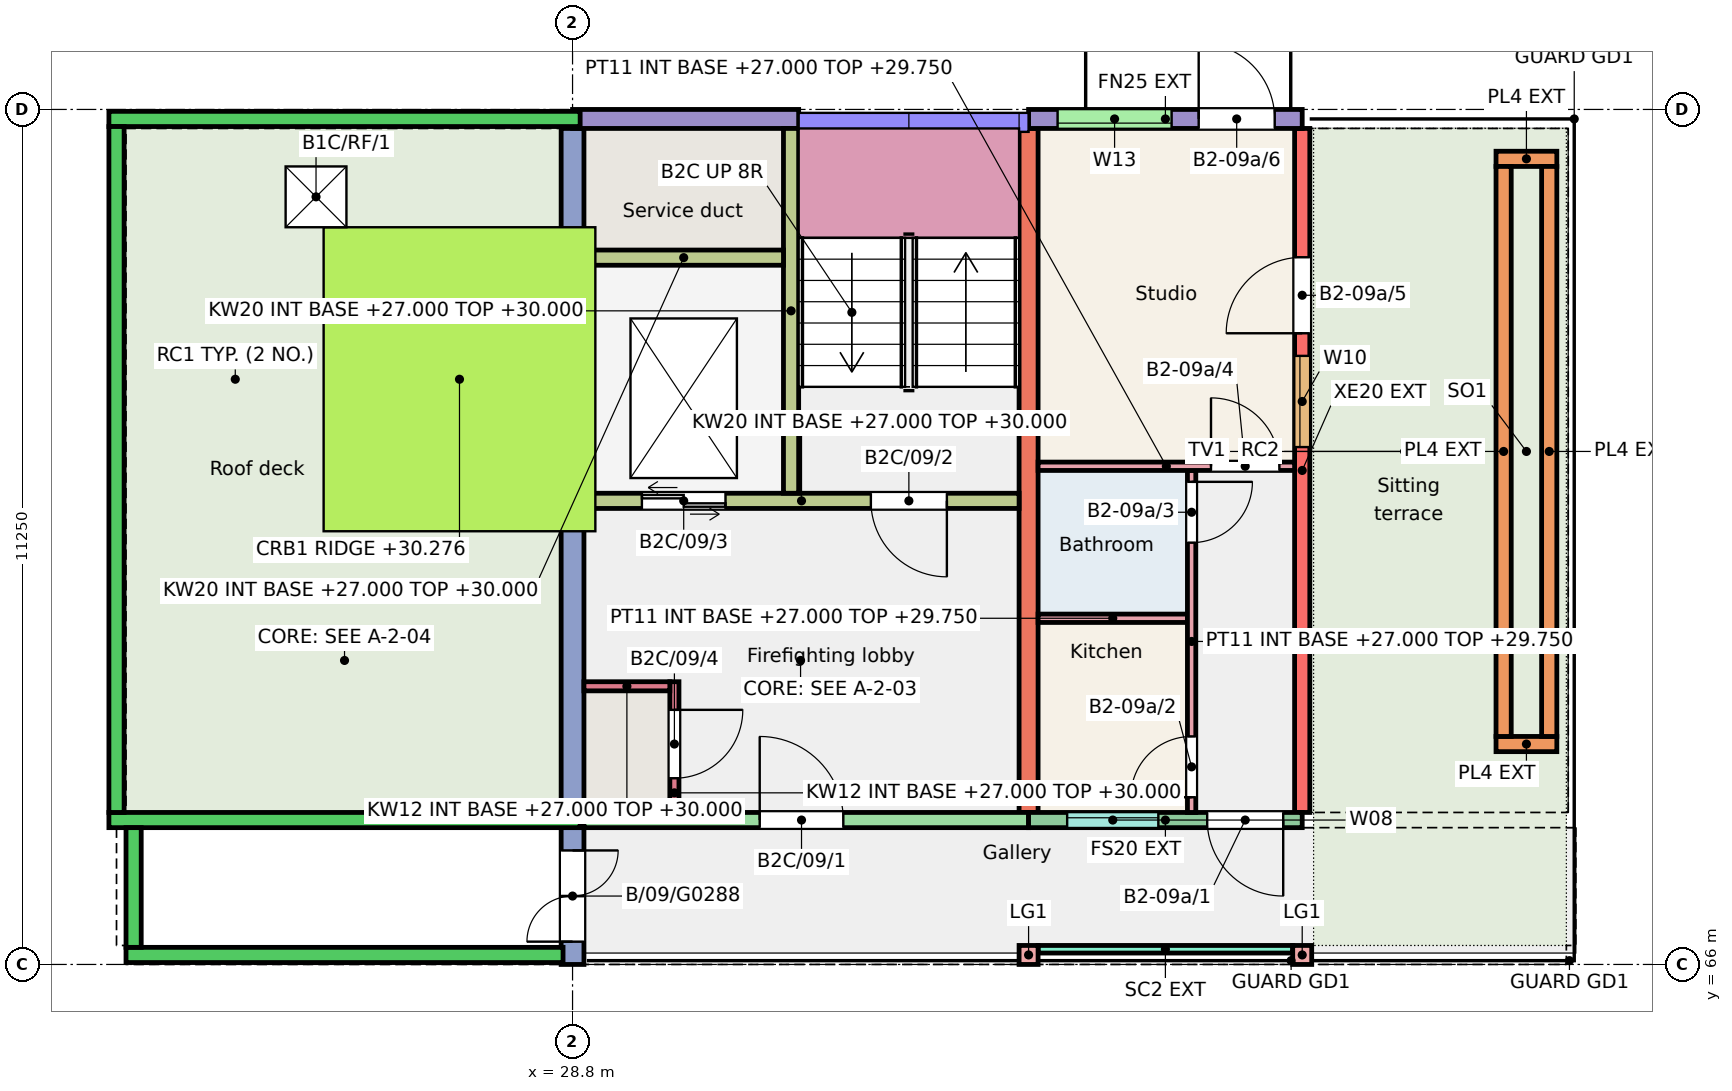
"""IFC4 building model, lengths in metres.
Left out: names, types, materials, properties, quantities, classifications, styles, units other than length and angle.
Written with IfcOpenShell. Run it as: python <this file> out.ifc"""

import sys

from ifc_helpers import new_model, si_unit, direction, frame, frame_2d, origin, origin_2d, place, context, subcontext, project, spatial, rectangle, extrude, element, fill, save


model = new_model("IFC4")
c1 = context("Model", 3, precision=1e-05, world=origin(), true_north=direction((0.0, 1.0)))
c2 = subcontext(c1, "Body", "Model", "MODEL_VIEW")
j1 = project(units=[si_unit("LENGTHUNIT", "METRE"), si_unit("PLANEANGLEUNIT", "RADIAN")], contexts=[c1])
p1 = place(None, origin())
s1 = spatial("IfcSite", under=j1, at=p1, CompositionType="ELEMENT")
p2 = place(p1, origin())
s2 = spatial("IfcBuilding", under=s1, at=p2, CompositionType="ELEMENT")
p3 = place(p2, frame((0.0, 0.0, 27.0)))
s3 = spatial("IfcBuildingStorey", under=s2, at=p3, CompositionType="ELEMENT", Elevation=27.0)
p4 = place(p3, frame((28.8, 66.0, 0.0), z_axis=(0.0, 0.0, 1.0), x_axis=(0.0, 1.0, 0.0)))
e1 = element("IfcWall", 1, at=p4, inside=s3, PredefinedType="SHEAR", context=c2, shape_type="SweptSolid", body=[
    extrude(rectangle(XDim=11.0, YDim=0.3, at=frame_2d((5.5, 0.0))), origin(), (0.0, 0.0, 1.0), 3.0),
])
p5 = place(p4, frame((0.3, 0.0, 0.0)))
e2 = element("IfcOpeningElement", 2, at=p5, cuts=e1, PredefinedType="OPENING", context=c2, shape_type="SweptSolid", body=[
    extrude(rectangle(XDim=1.2, YDim=2.1, at=frame_2d((0.6, 1.05))), frame((0.0, 0.16, 0.0), z_axis=(0.0, -1.0, 0.0), x_axis=(1.0, 0.0, 0.0)), (0.0, 0.0, 1.0), 0.32),
])
p6 = place(p3, frame((34.8, 68.0, 0.0), z_axis=(0.0, 0.0, 1.0), x_axis=(0.0, 1.0, 0.0)))
e3 = element("IfcWall", 3, at=p6, inside=s3, PredefinedType="SHEAR", context=c2, shape_type="SweptSolid", body=[
    extrude(rectangle(XDim=9.0, YDim=0.25, at=frame_2d((4.5, 0.0))), origin(), (0.0, 0.0, 1.0), 3.0),
])
p7 = place(p3, frame((38.4, 68.0, 0.0), z_axis=(0.0, 0.0, 1.0), x_axis=(0.0, 1.0, 0.0)))
e4 = element("IfcWall", 4, at=p7, inside=s3, PredefinedType="SHEAR", context=c2, shape_type="SweptSolid", body=[
    extrude(rectangle(XDim=9.0, YDim=0.2, at=frame_2d((4.5, 0.0))), origin(), (0.0, 0.0, 1.0), 3.0),
])
p8 = place(p7, frame((4.808, 0.0, 0.9)))
e5 = element("IfcOpeningElement", 5, at=p8, cuts=e4, PredefinedType="OPENING", context=c2, shape_type="SweptSolid", body=[
    extrude(rectangle(XDim=1.2, YDim=1.5, at=frame_2d((0.6, 0.75))), frame((0.0, 0.11, 0.0), z_axis=(0.0, -1.0, 0.0), x_axis=(1.0, 0.0, 0.0)), (0.0, 0.0, 1.0), 0.22),
])
p9 = place(p7, frame((6.305, 0.0, 0.0)))
e6 = element("IfcOpeningElement", 6, at=p9, cuts=e4, PredefinedType="OPENING", context=c2, shape_type="SweptSolid", body=[
    extrude(rectangle(XDim=1.0, YDim=2.1, at=frame_2d((0.5, 1.05))), frame((0.0, 0.11, 0.0), z_axis=(0.0, -1.0, 0.0), x_axis=(1.0, 0.0, 0.0)), (0.0, 0.0, 1.0), 0.22),
])
p10 = place(p3, frame((28.8, 77.125, 0.0), z_axis=(0.0, 0.0, 1.0), x_axis=(1.0, 0.0, 0.0)))
e7 = element("IfcWall", 7, at=p10, inside=s3, PredefinedType="SOLIDWALL", context=c2, shape_type="SweptSolid", body=[
    extrude(rectangle(XDim=2.975, YDim=0.25, at=frame_2d((1.487, 0.0))), origin(), (0.0, 0.0, 1.0), 3.0),
])
p11 = place(p3, frame((28.95, 67.9, 0.0), z_axis=(0.0, 0.0, 1.0), x_axis=(1.0, 0.0, 0.0)))
e8 = element("IfcWall", 8, at=p11, inside=s3, PredefinedType="SHEAR", context=c2, shape_type="SweptSolid", body=[
    extrude(rectangle(XDim=5.85, YDim=0.2, at=frame_2d((2.925, 0.0))), origin(), (0.0, 0.0, 1.0), 3.0),
])
p12 = place(p11, frame((2.312, 0.0, 0.0)))
e9 = element("IfcOpeningElement", 9, at=p12, cuts=e8, PredefinedType="OPENING", context=c2, shape_type="SweptSolid", body=[
    extrude(rectangle(XDim=1.1, YDim=2.1, at=frame_2d((0.55, 1.05))), frame((0.0, 0.11, 0.0), z_axis=(0.0, -1.0, 0.0), x_axis=(1.0, 0.0, 0.0)), (0.0, 0.0, 1.0), 0.22),
])
p13 = place(p3, frame((28.95, 72.1, 0.0), z_axis=(0.0, 0.0, 1.0), x_axis=(1.0, 0.0, 0.0)))
e10 = element("IfcWall", 10, at=p13, inside=s3, PredefinedType="SHEAR", context=c2, shape_type="SweptSolid", body=[
    extrude(rectangle(XDim=5.725, YDim=0.2, at=frame_2d((2.863, 0.0))), origin(), (0.0, 0.0, 1.0), 3.0),
])
p14 = place(p13, frame((3.775, 0.0, 0.0)))
e11 = element("IfcOpeningElement", 11, at=p14, cuts=e10, PredefinedType="OPENING", context=c2, shape_type="SweptSolid", body=[
    extrude(rectangle(XDim=1.0, YDim=2.1, at=frame_2d((0.5, 1.05))), frame((0.0, 0.11, 0.0), z_axis=(0.0, -1.0, 0.0), x_axis=(1.0, 0.0, 0.0)), (0.0, 0.0, 1.0), 0.22),
])
p15 = place(p13, frame((0.762, 0.0, 0.0)))
e12 = element("IfcOpeningElement", 12, at=p15, cuts=e10, PredefinedType="OPENING", context=c2, shape_type="SweptSolid", body=[
    extrude(rectangle(XDim=1.1, YDim=2.1, at=frame_2d((0.55, 1.05))), frame((0.0, 0.11, 0.0), z_axis=(0.0, -1.0, 0.0), x_axis=(1.0, 0.0, 0.0)), (0.0, 0.0, 1.0), 0.22),
])
p16 = place(p3, frame((31.675, 72.2, 0.0), z_axis=(0.0, 0.0, 1.0), x_axis=(0.0, 1.0, 0.0)))
e13 = element("IfcWall", 13, at=p16, inside=s3, PredefinedType="SHEAR", context=c2, shape_type="SweptSolid", body=[
    extrude(rectangle(XDim=4.8, YDim=0.2, at=frame_2d((2.4, 0.0))), origin(), (0.0, 0.0, 1.0), 3.0),
])
p17 = place(p3, frame((28.95, 75.3, 0.0), z_axis=(0.0, 0.0, 1.0), x_axis=(1.0, 0.0, 0.0)))
e14 = element("IfcWall", 14, at=p17, inside=s3, PredefinedType="SHEAR", context=c2, shape_type="SweptSolid", body=[
    extrude(rectangle(XDim=2.625, YDim=0.2, at=frame_2d((1.312, 0.0))), origin(), (0.0, 0.0, 1.0), 3.0),
])
p18 = place(p3, frame((30.14, 68.0, 0.0), z_axis=(0.0, 0.0, 1.0), x_axis=(0.0, 1.0, 0.0)))
e15 = element("IfcWall", 15, at=p18, inside=s3, PredefinedType="SHEAR", context=c2, shape_type="SweptSolid", body=[
    extrude(rectangle(XDim=1.72, YDim=0.12, at=frame_2d((0.86, 0.0))), origin(), (0.0, 0.0, 1.0), 3.0),
])
p19 = place(p18, frame((0.45, 0.0, 0.0)))
e16 = element("IfcOpeningElement", 16, at=p19, cuts=e15, PredefinedType="OPENING", context=c2, shape_type="SweptSolid", body=[
    extrude(rectangle(XDim=0.9, YDim=2.1, at=frame_2d((0.45, 1.05))), frame((0.0, 0.07, 0.0), z_axis=(0.0, -1.0, 0.0), x_axis=(1.0, 0.0, 0.0)), (0.0, 0.0, 1.0), 0.14),
])
p20 = place(p3, frame((28.95, 69.66, 0.0), z_axis=(0.0, 0.0, 1.0), x_axis=(1.0, 0.0, 0.0)))
e17 = element("IfcWall", 17, at=p20, inside=s3, PredefinedType="SHEAR", context=c2, shape_type="SweptSolid", body=[
    extrude(rectangle(XDim=1.13, YDim=0.12, at=frame_2d((0.565, 0.0))), origin(), (0.0, 0.0, 1.0), 3.0),
])
p21 = place(p3, frame((34.8, 77.125, 0.0), z_axis=(0.0, 0.0, 1.0), x_axis=(1.0, 0.0, 0.0)))
e18 = element("IfcWall", 18, at=p21, inside=s3, PredefinedType="SOLIDWALL", context=c2, shape_type="SweptSolid", body=[
    extrude(rectangle(XDim=3.6, YDim=0.25, at=frame_2d((1.8, 0.0))), origin(), (0.0, 0.0, 1.0), 3.0),
])
p22 = place(p21, frame((0.382, 0.0, 1.2)))
e19 = element("IfcOpeningElement", 19, at=p22, cuts=e18, PredefinedType="OPENING", context=c2, shape_type="SweptSolid", body=[
    extrude(rectangle(XDim=1.5, YDim=1.2, at=frame_2d((0.75, 0.6))), frame((0.0, 0.135, 0.0), z_axis=(0.0, -1.0, 0.0), x_axis=(1.0, 0.0, 0.0)), (0.0, 0.0, 1.0), 0.27),
])
p23 = place(p21, frame((2.238, 0.0, 0.0)))
e20 = element("IfcOpeningElement", 20, at=p23, cuts=e18, PredefinedType="OPENING", context=c2, shape_type="SweptSolid", body=[
    extrude(rectangle(XDim=1.0, YDim=2.1, at=frame_2d((0.5, 1.05))), frame((0.0, 0.135, 0.0), z_axis=(0.0, -1.0, 0.0), x_axis=(1.0, 0.0, 0.0)), (0.0, 0.0, 1.0), 0.27),
])
p24 = place(p3, frame((34.8, 67.9, 0.0), z_axis=(0.0, 0.0, 1.0), x_axis=(1.0, 0.0, 0.0)))
e21 = element("IfcWall", 21, at=p24, inside=s3, PredefinedType="SOLIDWALL", context=c2, shape_type="SweptSolid", body=[
    extrude(rectangle(XDim=3.6, YDim=0.2, at=frame_2d((1.8, 0.0))), origin(), (0.0, 0.0, 1.0), 3.0),
])
p25 = place(p24, frame((0.508, 0.0, 1.1)))
e22 = element("IfcOpeningElement", 22, at=p25, cuts=e21, PredefinedType="OPENING", context=c2, shape_type="SweptSolid", body=[
    extrude(rectangle(XDim=1.2, YDim=1.3, at=frame_2d((0.6, 0.65))), frame((0.0, 0.11, 0.0), z_axis=(0.0, -1.0, 0.0), x_axis=(1.0, 0.0, 0.0)), (0.0, 0.0, 1.0), 0.22),
])
p26 = place(p24, frame((2.35, 0.0, 0.0)))
e23 = element("IfcOpeningElement", 23, at=p26, cuts=e21, PredefinedType="OPENING", context=c2, shape_type="SweptSolid", body=[
    extrude(rectangle(XDim=1.0, YDim=2.1, at=frame_2d((0.5, 1.05))), frame((0.0, 0.11, 0.0), z_axis=(0.0, -1.0, 0.0), x_axis=(1.0, 0.0, 0.0)), (0.0, 0.0, 1.0), 0.22),
])
for number, where, z_axis, x_axis in (
    (24, (34.8, 66.125, 0.0), (0.0, 0.0, 1.0), (1.0, 0.0, 0.0)),
    (25, (38.4, 66.125, 0.0), (0.0, 0.0, 1.0), (1.0, 0.0, 0.0)),
):
    element("IfcColumn", number, at=place(p3, frame(where, z_axis=z_axis, x_axis=x_axis)), inside=s3, PredefinedType="COLUMN", context=c2, shape_type="SweptSolid", body=[
        extrude(rectangle(XDim=0.25, YDim=0.25, at=origin_2d()), origin(), (0.0, 0.0, 1.0), 3.0),
    ])
for number, where, z_axis, x_axis in (
    (26, (25.825, 72.1, 0.0), (0.0, 0.0, 1.0), (1.0, 0.0, 0.0)),
    (27, (25.825, 75.3, 0.0), (0.0, 0.0, 1.0), (1.0, 0.0, 0.0)),
):
    element("IfcWall", number, at=place(p3, frame(where, z_axis=z_axis, x_axis=x_axis)), inside=s3, PredefinedType="SHEAR", context=c2, shape_type="SweptSolid", body=[
        extrude(rectangle(XDim=2.825, YDim=0.2, at=frame_2d((1.413, 0.0))), origin(), (0.0, 0.0, 1.0), 1.5),
    ])
p27 = place(p3, frame((25.925, 72.2, 0.0), z_axis=(0.0, 0.0, 1.0), x_axis=(0.0, 1.0, 0.0)))
e28 = element("IfcWall", 28, at=p27, inside=s3, PredefinedType="SHEAR", context=c2, shape_type="SweptSolid", body=[
    extrude(rectangle(XDim=3.0, YDim=0.2, at=frame_2d((1.5, 0.0))), origin(), (0.0, 0.0, 1.0), 1.5),
])
for number, where, z_axis, x_axis in (
    (29, (22.7, 77.125, 0.0), (0.0, 0.0, 1.0), (1.0, 0.0, 0.0)),
    (30, (22.7, 67.9, 0.0), (0.0, 0.0, 1.0), (1.0, 0.0, 0.0)),
):
    element("IfcWall", number, at=place(p3, frame(where, z_axis=z_axis, x_axis=x_axis)), inside=s3, PredefinedType="PARAPET", context=c2, shape_type="SweptSolid", body=[
        extrude(rectangle(XDim=6.2, YDim=0.2, at=frame_2d((3.1, 0.0))), origin(), (0.0, 0.0, 1.0), 1.1),
    ])
p28 = place(p3, frame((22.8, 68.0, 0.0), z_axis=(0.0, 0.0, 1.0), x_axis=(0.0, 1.0, 0.0)))
e31 = element("IfcWall", 31, at=p28, inside=s3, PredefinedType="PARAPET", context=c2, shape_type="SweptSolid", body=[
    extrude(rectangle(XDim=9.025, YDim=0.2, at=frame_2d((4.512, 0.0))), origin(), (0.0, 0.0, 1.0), 1.1),
])
p29 = place(p3, frame((22.925, 66.125, 0.0), z_axis=(0.0, 0.0, 1.0), x_axis=(1.0, 0.0, 0.0)))
e32 = element("IfcWall", 32, at=p29, inside=s3, PredefinedType="PARAPET", context=c2, shape_type="SweptSolid", body=[
    extrude(rectangle(XDim=5.75, YDim=0.2, at=frame_2d((2.875, 0.0))), origin(), (0.0, 0.0, 1.0), 1.1),
])
p30 = place(p3, frame((23.025, 66.225, 0.0), z_axis=(0.0, 0.0, 1.0), x_axis=(0.0, 1.0, 0.0)))
e33 = element("IfcWall", 33, at=p30, inside=s3, PredefinedType="PARAPET", context=c2, shape_type="SweptSolid", body=[
    extrude(rectangle(XDim=1.575, YDim=0.2, at=frame_2d((0.788, 0.0))), origin(), (0.0, 0.0, 1.0), 1.1),
])
for number, where, z_axis, x_axis in (
    (34, (40.95, 68.9, 0.01), (0.0, 0.0, 1.0), (1.0, 0.0, 0.0)),
    (35, (40.95, 76.6, 0.01), (0.0, 0.0, 1.0), (1.0, 0.0, 0.0)),
):
    element("IfcWall", number, at=place(p3, frame(where, z_axis=z_axis, x_axis=x_axis)), inside=s3, PredefinedType="SOLIDWALL", context=c2, shape_type="SweptSolid", body=[
        extrude(rectangle(XDim=0.8, YDim=0.2, at=frame_2d((0.4, 0.0))), origin(), (0.0, 0.0, 1.0), 0.45),
    ])
for number, where, z_axis, x_axis in (
    (36, (41.05, 69.0, 0.01), (0.0, 0.0, 1.0), (0.0, 1.0, 0.0)),
    (37, (41.65, 69.0, 0.01), (0.0, 0.0, 1.0), (0.0, 1.0, 0.0)),
):
    element("IfcWall", number, at=place(p3, frame(where, z_axis=z_axis, x_axis=x_axis)), inside=s3, PredefinedType="SOLIDWALL", context=c2, shape_type="SweptSolid", body=[
        extrude(rectangle(XDim=7.5, YDim=0.2, at=frame_2d((3.75, 0.0))), origin(), (0.0, 0.0, 1.0), 0.45),
    ])
p31 = place(p3, frame((34.925, 66.2, 0.0), z_axis=(0.0, 0.0, 1.0), x_axis=(1.0, 0.0, 0.0)))
e38 = element("IfcWall", 38, at=p31, inside=s3, PredefinedType="SOLIDWALL", context=c2, shape_type="SweptSolid", body=[
    extrude(rectangle(XDim=3.35, YDim=0.1, at=frame_2d((1.675, 0.0))), origin(), (0.0, 0.0, 1.0), 2.45),
])
p32 = place(p3, frame((34.925, 70.555, 0.0), z_axis=(0.0, 0.0, 1.0), x_axis=(1.0, 0.0, 0.0)))
e39 = element("IfcWall", 39, at=p32, inside=s3, PredefinedType="PARTITIONING", context=c2, shape_type="SweptSolid", body=[
    extrude(rectangle(XDim=1.965, YDim=0.11, at=frame_2d((0.982, 0.0))), origin(), (0.0, 0.0, 1.0), 2.75),
])
p33 = place(p3, frame((36.945, 68.0, 0.0), z_axis=(0.0, 0.0, 1.0), x_axis=(0.0, 1.0, 0.0)))
e40 = element("IfcWall", 40, at=p33, inside=s3, PredefinedType="PARTITIONING", context=c2, shape_type="SweptSolid", body=[
    extrude(rectangle(XDim=4.5, YDim=0.11, at=frame_2d((2.25, 0.0))), origin(), (0.0, 0.0, 1.0), 2.75),
])
p34 = place(p33, frame((0.2, 0.0, 0.0)))
e41 = element("IfcOpeningElement", 41, at=p34, cuts=e40, PredefinedType="OPENING", context=c2, shape_type="SweptSolid", body=[
    extrude(rectangle(XDim=0.8, YDim=2.1, at=frame_2d((0.4, 1.05))), frame((0.0, 0.065, 0.0), z_axis=(0.0, -1.0, 0.0), x_axis=(1.0, 0.0, 0.0)), (0.0, 0.0, 1.0), 0.13),
])
p35 = place(p33, frame((3.55, 0.0, 0.0)))
e42 = element("IfcOpeningElement", 42, at=p35, cuts=e40, PredefinedType="OPENING", context=c2, shape_type="SweptSolid", body=[
    extrude(rectangle(XDim=0.8, YDim=2.1, at=frame_2d((0.4, 1.05))), frame((0.0, 0.065, 0.0), z_axis=(0.0, -1.0, 0.0), x_axis=(1.0, 0.0, 0.0)), (0.0, 0.0, 1.0), 0.13),
])
p36 = place(p3, frame((34.925, 72.555, 0.0), z_axis=(0.0, 0.0, 1.0), x_axis=(1.0, 0.0, 0.0)))
e43 = element("IfcWall", 43, at=p36, inside=s3, PredefinedType="PARTITIONING", context=c2, shape_type="SweptSolid", body=[
    extrude(rectangle(XDim=3.375, YDim=0.11, at=frame_2d((1.688, 0.0))), origin(), (0.0, 0.0, 1.0), 2.75),
])
p37 = place(p36, frame((2.275, 0.0, 0.0)))
e44 = element("IfcOpeningElement", 44, at=p37, cuts=e43, PredefinedType="OPENING", context=c2, shape_type="SweptSolid", body=[
    extrude(rectangle(XDim=0.9, YDim=2.1, at=frame_2d((0.45, 1.05))), frame((0.0, 0.065, 0.0), z_axis=(0.0, -1.0, 0.0), x_axis=(1.0, 0.0, 0.0)), (0.0, 0.0, 1.0), 0.13),
])
p38 = place(p3, frame((0.0, 0.0, -0.25)))
p39 = place(p38, frame((25.425, 76.1, 0.0)))
p40 = place(p39, frame((0.0, 0.0, 0.2)))
e45 = element("IfcDoor", 45, at=p40, inside=s3, OperationType="SINGLE_SWING_LEFT", PredefinedType="TRAPDOOR", context=c2, shape_type="SweptSolid", body=[
    extrude(rectangle(XDim=0.8, YDim=0.8, at=origin_2d()), origin(), (0.0, 0.0, 1.0), 0.05),
])
p41 = place(p25, origin())
e46 = element("IfcWindow", 46, at=p41, inside=s3, PartitioningType="SINGLE_PANEL", PredefinedType="WINDOW", context=c2, shape_type="SweptSolid", body=[
    extrude(rectangle(XDim=1.2, YDim=1.3, at=frame_2d((0.6, 0.65))), frame((0.0, 0.06, 0.0), z_axis=(0.0, -1.0, 0.0), x_axis=(1.0, 0.0, 0.0)), (0.0, 0.0, 1.0), 0.06),
])
fill(e22, e46)
p42 = place(p22, origin())
e47 = element("IfcWindow", 47, at=p42, inside=s3, PartitioningType="SINGLE_PANEL", PredefinedType="WINDOW", context=c2, shape_type="SweptSolid", body=[
    extrude(rectangle(XDim=1.5, YDim=1.2, at=frame_2d((0.75, 0.6))), frame((0.0, -0.025, 0.0), z_axis=(0.0, -1.0, 0.0), x_axis=(1.0, 0.0, 0.0)), (0.0, 0.0, 1.0), 0.06),
])
fill(e19, e47)
p43 = place(p8, origin())
e48 = element("IfcWindow", 48, at=p43, inside=s3, PartitioningType="SINGLE_PANEL", PredefinedType="WINDOW", context=c2, shape_type="SweptSolid", body=[
    extrude(rectangle(XDim=1.2, YDim=1.5, at=frame_2d((0.6, 0.75))), frame((0.0, 0.06, 0.0), z_axis=(0.0, -1.0, 0.0), x_axis=(1.0, 0.0, 0.0)), (0.0, 0.0, 1.0), 0.06),
])
fill(e5, e48)
p44 = place(p26, origin())
e49 = element("IfcDoor", 49, at=p44, inside=s3, OperationType="SINGLE_SWING_RIGHT", PredefinedType="DOOR", context=c2, shape_type="SweptSolid", body=[
    extrude(rectangle(XDim=1.0, YDim=2.1, at=frame_2d((0.5, 1.05))), frame((0.0, 0.025, 0.0), z_axis=(0.0, -1.0, 0.0), x_axis=(1.0, 0.0, 0.0)), (0.0, 0.0, 1.0), 0.05),
])
fill(e23, e49)
p45 = place(p34, origin())
e50 = element("IfcDoor", 50, at=p45, inside=s3, OperationType="SINGLE_SWING_LEFT", PredefinedType="DOOR", context=c2, shape_type="SweptSolid", body=[
    extrude(rectangle(XDim=0.8, YDim=2.1, at=frame_2d((0.4, 1.05))), frame((0.0, 0.025, 0.0), z_axis=(0.0, -1.0, 0.0), x_axis=(1.0, 0.0, 0.0)), (0.0, 0.0, 1.0), 0.05),
])
fill(e41, e50)
p46 = place(p35, origin())
e51 = element("IfcDoor", 51, at=p46, inside=s3, OperationType="SINGLE_SWING_RIGHT", PredefinedType="DOOR", context=c2, shape_type="SweptSolid", body=[
    extrude(rectangle(XDim=0.8, YDim=2.1, at=frame_2d((0.4, 1.05))), frame((0.0, 0.025, 0.0), z_axis=(0.0, -1.0, 0.0), x_axis=(1.0, 0.0, 0.0)), (0.0, 0.0, 1.0), 0.05),
])
fill(e42, e51)
p47 = place(p37, origin())
e52 = element("IfcDoor", 52, at=p47, inside=s3, OperationType="SINGLE_SWING_LEFT", PredefinedType="DOOR", context=c2, shape_type="SweptSolid", body=[
    extrude(rectangle(XDim=0.9, YDim=2.1, at=frame_2d((0.45, 1.05))), frame((0.0, 0.025, 0.0), z_axis=(0.0, -1.0, 0.0), x_axis=(1.0, 0.0, 0.0)), (0.0, 0.0, 1.0), 0.05),
])
fill(e44, e52)
p48 = place(p9, origin())
e53 = element("IfcDoor", 53, at=p48, inside=s3, OperationType="SINGLE_SWING_LEFT", PredefinedType="DOOR", context=c2, shape_type="SweptSolid", body=[
    extrude(rectangle(XDim=1.0, YDim=2.1, at=frame_2d((0.5, 1.05))), frame((0.0, 0.025, 0.0), z_axis=(0.0, -1.0, 0.0), x_axis=(1.0, 0.0, 0.0)), (0.0, 0.0, 1.0), 0.05),
])
fill(e6, e53)
p49 = place(p23, origin())
e54 = element("IfcDoor", 54, at=p49, inside=s3, OperationType="SINGLE_SWING_LEFT", PredefinedType="DOOR", context=c2, shape_type="SweptSolid", body=[
    extrude(rectangle(XDim=1.0, YDim=2.1, at=frame_2d((0.5, 1.05))), frame((0.0, 0.025, 0.0), z_axis=(0.0, -1.0, 0.0), x_axis=(1.0, 0.0, 0.0)), (0.0, 0.0, 1.0), 0.05),
])
fill(e20, e54)
p50 = place(p12, origin())
e55 = element("IfcDoor", 55, at=p50, inside=s3, OperationType="SINGLE_SWING_LEFT", PredefinedType="DOOR", context=c2, shape_type="SweptSolid", body=[
    extrude(rectangle(XDim=1.1, YDim=2.1, at=frame_2d((0.55, 1.05))), frame((0.0, 0.025, 0.0), z_axis=(0.0, -1.0, 0.0), x_axis=(1.0, 0.0, 0.0)), (0.0, 0.0, 1.0), 0.05),
])
fill(e9, e55)
p51 = place(p14, origin())
e56 = element("IfcDoor", 56, at=p51, inside=s3, OperationType="SINGLE_SWING_RIGHT", PredefinedType="DOOR", context=c2, shape_type="SweptSolid", body=[
    extrude(rectangle(XDim=1.0, YDim=2.1, at=frame_2d((0.5, 1.05))), frame((0.0, 0.025, 0.0), z_axis=(0.0, -1.0, 0.0), x_axis=(1.0, 0.0, 0.0)), (0.0, 0.0, 1.0), 0.05),
])
fill(e11, e56)
p52 = place(p15, origin())
e57 = element("IfcDoor", 57, at=p52, inside=s3, OperationType="DOUBLE_DOOR_SLIDING", PredefinedType="DOOR", context=c2, shape_type="SweptSolid", body=[
    extrude(rectangle(XDim=1.1, YDim=2.1, at=frame_2d((0.55, 1.05))), frame((0.0, 0.025, 0.0), z_axis=(0.0, -1.0, 0.0), x_axis=(1.0, 0.0, 0.0)), (0.0, 0.0, 1.0), 0.05),
])
fill(e12, e57)
p53 = place(p19, origin())
e58 = element("IfcDoor", 58, at=p53, inside=s3, OperationType="SINGLE_SWING_RIGHT", PredefinedType="DOOR", context=c2, shape_type="SweptSolid", body=[
    extrude(rectangle(XDim=0.9, YDim=2.1, at=frame_2d((0.45, 1.05))), frame((0.0, 0.025, 0.0), z_axis=(0.0, -1.0, 0.0), x_axis=(1.0, 0.0, 0.0)), (0.0, 0.0, 1.0), 0.05),
])
fill(e16, e58)
p54 = place(p5, origin())
e59 = element("IfcDoor", 59, at=p54, inside=s3, OperationType="DOUBLE_DOOR_SINGLE_SWING", PredefinedType="DOOR", context=c2, shape_type="SweptSolid", body=[
    extrude(rectangle(XDim=1.2, YDim=2.1, at=frame_2d((0.6, 1.05))), frame((0.0, 0.025, 0.0), z_axis=(0.0, -1.0, 0.0), x_axis=(1.0, 0.0, 0.0)), (0.0, 0.0, 1.0), 0.05),
])
fill(e2, e59)
save(model, sys.argv[1])
